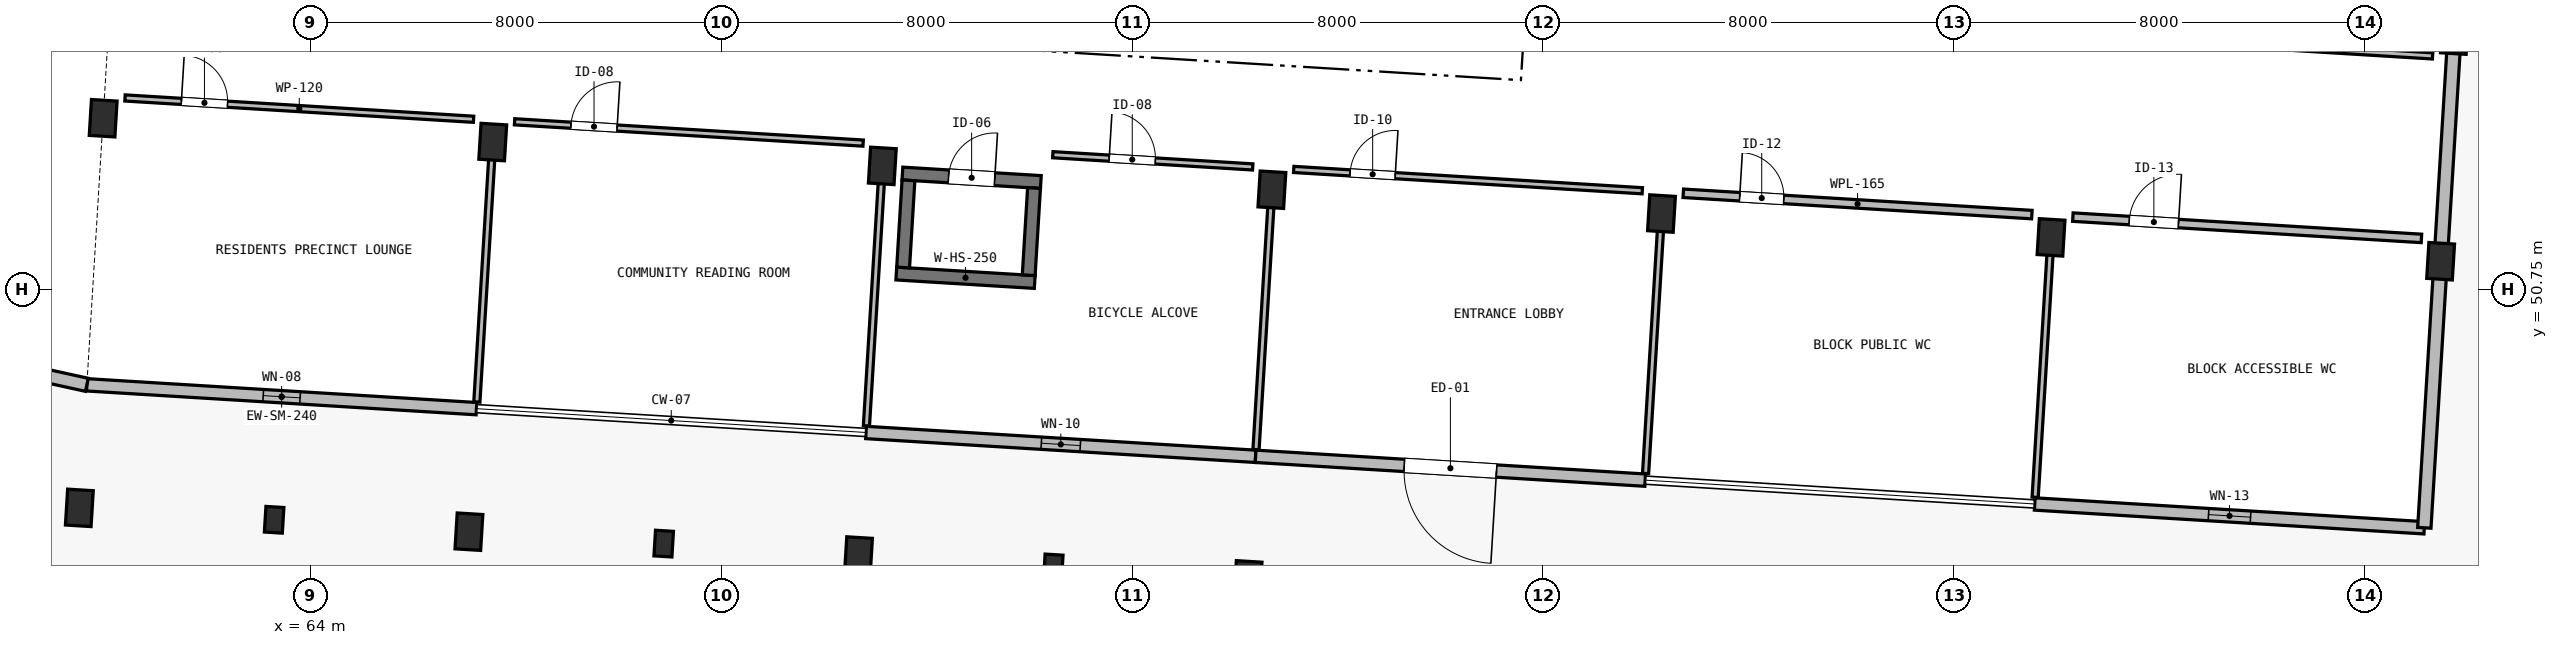
"""IFC4 building model, lengths in metres.
Left out: names, types, materials, properties, quantities, classifications, styles, units other than length and angle.
Written with IfcOpenShell. Run it as: python <this file> out.ifc"""

import sys

from ifc_helpers import new_model, si_unit, direction, frame, frame_2d, origin, origin_2d, place, context, subcontext, project, spatial, rectangle, extrude, element, fill, save


model = new_model("IFC4")
c1 = context("Model", 3, precision=1e-05, world=origin(), true_north=direction((0.0, 1.0)))
c2 = subcontext(c1, "Body", "Model", "MODEL_VIEW")
j1 = project(units=[si_unit("LENGTHUNIT", "METRE"), si_unit("PLANEANGLEUNIT", "RADIAN")], contexts=[c1])
p1 = place(None, origin())
s1 = spatial("IfcSite", under=j1, at=p1, CompositionType="ELEMENT")
p2 = place(p1, origin())
s2 = spatial("IfcBuilding", under=s1, at=p2, CompositionType="ELEMENT")
p3 = place(p2, origin())
s3 = spatial("IfcBuildingStorey", under=s2, at=p3, CompositionType="ELEMENT", Elevation=0.0)
for number, where, z_axis, x_axis in (
    (1, (59.5, 46.5, -0.35), (0.0, 0.0, 1.0), (0.998, -0.061, 0.0)),
    (2, (59.964, 54.086, -0.35), (0.0, 0.0, 1.0), (0.998, -0.061, 0.0)),
    (3, (67.086, 46.036, -0.35), (0.0, 0.0, 1.0), (0.998, -0.061, 0.0)),
    (4, (67.55, 53.622, -0.35), (0.0, 0.0, 1.0), (0.998, -0.061, 0.0)),
    (5, (74.672, 45.572, -0.35), (0.0, 0.0, 1.0), (0.998, -0.061, 0.0)),
    (6, (75.135, 53.158, -0.35), (0.0, 0.0, 1.0), (0.998, -0.061, 0.0)),
    (7, (82.258, 45.108, -0.35), (0.0, 0.0, 1.0), (0.998, -0.061, 0.0)),
    (8, (82.721, 52.694, -0.35), (0.0, 0.0, 1.0), (0.998, -0.061, 0.0)),
    (9, (90.307, 52.23, -0.35), (0.0, 0.0, 1.0), (0.998, -0.061, 0.0)),
    (10, (97.893, 51.766, -0.35), (0.0, 0.0, 1.0), (0.998, -0.061, 0.0)),
    (11, (105.479, 51.302, -0.35), (0.0, 0.0, 1.0), (0.998, -0.061, 0.0)),
    (12, (105.748, 55.694, -0.35), (0.0, 0.0, 1.0), (0.998, -0.061, 0.0)),
):
    element("IfcColumn", number, at=place(p3, frame(where, z_axis=z_axis, x_axis=x_axis)), inside=s3, PredefinedType="COLUMN", context=c2, shape_type="SweptSolid", body=[
        extrude(rectangle(XDim=0.5, YDim=0.7, at=origin_2d()), origin(), (0.0, 0.0, 1.0), 4.85),
    ])
for number, where, z_axis, x_axis in (
    (13, (63.293, 46.268, -0.35), (0.0, 0.0, 1.0), (0.998, -0.061, 0.0)),
    (14, (70.879, 45.804, -0.35), (0.0, 0.0, 1.0), (0.998, -0.061, 0.0)),
    (15, (78.465, 45.34, -0.35), (0.0, 0.0, 1.0), (0.998, -0.061, 0.0)),
):
    element("IfcColumn", number, at=place(p3, frame(where, z_axis=z_axis, x_axis=x_axis)), inside=s3, PredefinedType="PILASTER", context=c2, shape_type="SweptSolid", body=[
        extrude(rectangle(XDim=0.35, YDim=0.5, at=origin_2d()), origin(), (0.0, 0.0, 1.0), 3.7),
    ])
p4 = place(p3, frame((75.408, 51.062, -0.35), z_axis=(0.0, 0.0, 1.0), x_axis=(0.998135757881, -0.061032850491, 0.0)))
e16 = element("IfcWall", 16, at=p4, inside=s3, PredefinedType="SHEAR", context=c2, shape_type="SweptSolid", body=[
    extrude(rectangle(XDim=2.7, YDim=0.25, at=frame_2d((1.35, 0.0))), origin(), (0.0, 0.0, 1.0), 4.85),
])
p5 = place(p3, frame((75.527, 53.009, -0.35), z_axis=(0.0, 0.0, 1.0), x_axis=(0.998129907752, -0.061128448781, 0.0)))
e17 = element("IfcWall", 17, at=p5, inside=s3, PredefinedType="SHEAR", context=c2, shape_type="SweptSolid", body=[
    extrude(rectangle(XDim=2.7, YDim=0.25, at=frame_2d((1.35, 0.0))), origin(), (0.0, 0.0, 1.0), 4.85),
])
p6 = place(p5, frame((0.9, 0.0, 0.35)))
e18 = element("IfcOpeningElement", 18, at=p6, cuts=e17, PredefinedType="OPENING", context=c2, shape_type="SweptSolid", body=[
    extrude(rectangle(XDim=0.9, YDim=2.05, at=frame_2d((0.45, 1.025))), frame((0.0, 0.14, 0.0), z_axis=(0.0, -1.0, 0.0), x_axis=(1.0, 0.0, 0.0)), (0.0, 0.0, 1.0), 0.28),
])
p7 = place(p3, frame((75.541, 51.179, -0.35), z_axis=(0.0, 0.0, 1.0), x_axis=(0.061037062968, 0.998135500293, 0.0)))
e19 = element("IfcWall", 19, at=p7, inside=s3, PredefinedType="SHEAR", context=c2, shape_type="SweptSolid", body=[
    extrude(rectangle(XDim=1.7, YDim=0.25, at=frame_2d((0.85, 0.0))), origin(), (0.0, 0.0, 1.0), 4.85),
])
p8 = place(p3, frame((77.986, 51.03, -0.35), z_axis=(0.0, 0.0, 1.0), x_axis=(0.061028314627, 0.998136035225, 0.0)))
e20 = element("IfcWall", 20, at=p8, inside=s3, PredefinedType="SHEAR", context=c2, shape_type="SweptSolid", body=[
    extrude(rectangle(XDim=1.7, YDim=0.25, at=frame_2d((0.85, 0.0))), origin(), (0.0, 0.0, 1.0), 4.85),
])
p9 = place(p3, frame((67.232, 48.432, 0.0), z_axis=(0.0, 0.0, 1.0), x_axis=(-0.998135669243, 0.061034300063, 0.0)))
e21 = element("IfcWall", 21, at=p9, inside=s3, PredefinedType="SOLIDWALL", context=c2, shape_type="SweptSolid", body=[
    extrude(rectangle(XDim=7.6, YDim=0.24, at=frame_2d((3.8, 0.0))), origin(), (0.0, 0.0, 1.0), 3.35),
])
p10 = place(p9, frame((3.44, 0.0, 0.55)))
e22 = element("IfcOpeningElement", 22, at=p10, cuts=e21, PredefinedType="OPENING", context=c2, shape_type="SweptSolid", body=[
    extrude(rectangle(XDim=0.72, YDim=2.16, at=frame_2d((0.36, 1.08))), frame((0.0, 0.135, 0.0), z_axis=(0.0, -1.0, 0.0), x_axis=(1.0, 0.0, 0.0)), (0.0, 0.0, 1.0), 0.27),
])
p11 = place(p3, frame((82.404, 47.504, 0.0), z_axis=(0.0, 0.0, 1.0), x_axis=(-0.998135669243, 0.061034300063, 0.0)))
e23 = element("IfcWall", 23, at=p11, inside=s3, PredefinedType="SOLIDWALL", context=c2, shape_type="SweptSolid", body=[
    extrude(rectangle(XDim=7.6, YDim=0.24, at=frame_2d((3.8, 0.0))), origin(), (0.0, 0.0, 1.0), 3.35),
])
p12 = place(p11, frame((3.42, 0.0, 0.55)))
e24 = element("IfcOpeningElement", 24, at=p12, cuts=e23, PredefinedType="OPENING", context=c2, shape_type="SweptSolid", body=[
    extrude(rectangle(XDim=0.76, YDim=2.34, at=frame_2d((0.38, 1.17))), frame((0.0, 0.135, 0.0), z_axis=(0.0, -1.0, 0.0), x_axis=(1.0, 0.0, 0.0)), (0.0, 0.0, 1.0), 0.27),
])
p13 = place(p3, frame((89.99, 47.04, 0.0), z_axis=(0.0, 0.0, 1.0), x_axis=(-0.998133591969, 0.061068261669, 0.0)))
e25 = element("IfcWall", 25, at=p13, inside=s3, PredefinedType="SOLIDWALL", context=c2, shape_type="SweptSolid", body=[
    extrude(rectangle(XDim=7.6, YDim=0.24, at=frame_2d((3.8, 0.0))), origin(), (0.0, 0.0, 1.0), 3.35),
])
p14 = place(p13, frame((2.9, 0.0, 0.0)))
e26 = element("IfcOpeningElement", 26, at=p14, cuts=e25, PredefinedType="OPENING", context=c2, shape_type="SweptSolid", body=[
    extrude(rectangle(XDim=1.8, YDim=2.4, at=frame_2d((0.9, 1.2))), frame((0.0, 0.135, 0.0), z_axis=(0.0, -1.0, 0.0), x_axis=(1.0, 0.0, 0.0)), (0.0, 0.0, 1.0), 0.27),
])
p15 = place(p3, frame((105.161, 46.112, 0.0), z_axis=(0.0, 0.0, 1.0), x_axis=(-0.998135549572, 0.061036257095, 0.0)))
e27 = element("IfcWall", 27, at=p15, inside=s3, PredefinedType="SOLIDWALL", context=c2, shape_type="SweptSolid", body=[
    extrude(rectangle(XDim=7.6, YDim=0.24, at=frame_2d((3.8, 0.0))), origin(), (0.0, 0.0, 1.0), 3.35),
])
p16 = place(p15, frame((3.39, 0.0, 0.55)))
e28 = element("IfcOpeningElement", 28, at=p16, cuts=e27, PredefinedType="OPENING", context=c2, shape_type="SweptSolid", body=[
    extrude(rectangle(XDim=0.82, YDim=2.18, at=frame_2d((0.41, 1.09))), frame((0.0, 0.135, 0.0), z_axis=(0.0, -1.0, 0.0), x_axis=(1.0, 0.0, 0.0)), (0.0, 0.0, 1.0), 0.27),
])
p17 = place(p3, frame((59.646, 48.896, 0.0), z_axis=(0.0, 0.0, 1.0), x_axis=(-0.976741647881, 0.214419573019, 0.0)))
e29 = element("IfcWall", 29, at=p17, inside=s3, PredefinedType="SOLIDWALL", context=c2, shape_type="SweptSolid", body=[
    extrude(rectangle(XDim=6.478, YDim=0.26, at=frame_2d((3.239, 0.0))), origin(), (0.0, 0.0, 1.0), 3.85),
])
p18 = place(p3, frame((53.32, 50.284, 0.0), z_axis=(0.0, 0.0, 1.0), x_axis=(0.423516863973, 0.905888219335, 0.0)))
e30 = element("IfcWall", 30, at=p18, inside=s3, PredefinedType="SOLIDWALL", context=c2, shape_type="SweptSolid", body=[
    extrude(rectangle(XDim=17.418, YDim=0.26, at=frame_2d((8.709, 0.0))), origin(), (0.0, 0.0, 1.0), 3.35),
])
p19 = place(p3, frame((106.065, 60.884, 0.0), z_axis=(0.0, 0.0, 1.0), x_axis=(-0.06105237445, -0.998134563861, 0.0)))
e31 = element("IfcWall", 31, at=p19, inside=s3, PredefinedType="SOLIDWALL", context=c2, shape_type="SweptSolid", body=[
    extrude(rectangle(XDim=14.8, YDim=0.26, at=frame_2d((7.4, 0.0))), origin(), (0.0, 0.0, 1.0), 3.35),
])
p20 = place(p3, frame((60.389, 54.481, 0.0), z_axis=(0.0, 0.0, 1.0), x_axis=(0.998133446169, -0.061070644651, 0.0)))
e32 = element("IfcWall", 32, at=p20, inside=s3, PredefinedType="PARTITIONING", context=c2, shape_type="SweptSolid", body=[
    extrude(rectangle(XDim=6.8, YDim=0.12, at=frame_2d((3.4, 0.0))), origin(), (0.0, 0.0, 1.0), 4.22),
])
p21 = place(p20, frame((1.1, 0.0, 0.0)))
e33 = element("IfcOpeningElement", 33, at=p21, cuts=e32, PredefinedType="OPENING", context=c2, shape_type="SweptSolid", body=[
    extrude(rectangle(XDim=0.9, YDim=2.1, at=frame_2d((0.45, 1.05))), frame((0.0, 0.075, 0.0), z_axis=(0.0, -1.0, 0.0), x_axis=(1.0, 0.0, 0.0)), (0.0, 0.0, 1.0), 0.15),
])
p22 = place(p3, frame((67.975, 54.017, 0.0), z_axis=(0.0, 0.0, 1.0), x_axis=(0.998135634047, -0.061034875648, 0.0)))
e34 = element("IfcWall", 34, at=p22, inside=s3, PredefinedType="PARTITIONING", context=c2, shape_type="SweptSolid", body=[
    extrude(rectangle(XDim=6.8, YDim=0.12, at=frame_2d((3.4, 0.0))), origin(), (0.0, 0.0, 1.0), 4.22),
])
p23 = place(p22, frame((1.1, 0.0, 0.0)))
e35 = element("IfcOpeningElement", 35, at=p23, cuts=e34, PredefinedType="OPENING", context=c2, shape_type="SweptSolid", body=[
    extrude(rectangle(XDim=0.9, YDim=2.1, at=frame_2d((0.45, 1.05))), frame((0.0, 0.075, 0.0), z_axis=(0.0, -1.0, 0.0), x_axis=(1.0, 0.0, 0.0)), (0.0, 0.0, 1.0), 0.15),
])
p24 = place(p3, frame((67.24, 48.561, 0.0), z_axis=(0.0, 0.0, 1.0), x_axis=(0.061034663384, 0.998135647027, 0.0)))
e36 = element("IfcWall", 36, at=p24, inside=s3, PredefinedType="PARTITIONING", context=c2, shape_type="SweptSolid", body=[
    extrude(rectangle(XDim=4.74, YDim=0.12, at=frame_2d((2.37, 0.0))), origin(), (0.0, 0.0, 1.0), 3.32),
])
p25 = place(p3, frame((78.455, 53.376, 0.0), z_axis=(0.0, 0.0, 1.0), x_axis=(0.998131890624, -0.061096063045, 0.0)))
e37 = element("IfcWall", 37, at=p25, inside=s3, PredefinedType="PARTITIONING", context=c2, shape_type="SweptSolid", body=[
    extrude(rectangle(XDim=3.9, YDim=0.12, at=frame_2d((1.95, 0.0))), origin(), (0.0, 0.0, 1.0), 4.22),
])
p26 = place(p25, frame((1.1, 0.0, 0.0)))
e38 = element("IfcOpeningElement", 38, at=p26, cuts=e37, PredefinedType="OPENING", context=c2, shape_type="SweptSolid", body=[
    extrude(rectangle(XDim=0.9, YDim=2.1, at=frame_2d((0.45, 1.05))), frame((0.0, 0.075, 0.0), z_axis=(0.0, -1.0, 0.0), x_axis=(1.0, 0.0, 0.0)), (0.0, 0.0, 1.0), 0.15),
])
p27 = place(p3, frame((74.826, 48.097, 0.0), z_axis=(0.0, 0.0, 1.0), x_axis=(0.061034663384, 0.998135647027, 0.0)))
e39 = element("IfcWall", 39, at=p27, inside=s3, PredefinedType="PARTITIONING", context=c2, shape_type="SweptSolid", body=[
    extrude(rectangle(XDim=4.74, YDim=0.12, at=frame_2d((2.37, 0.0))), origin(), (0.0, 0.0, 1.0), 3.32),
])
p28 = place(p3, frame((83.146, 53.089, 0.0), z_axis=(0.0, 0.0, 1.0), x_axis=(0.998135634047, -0.061034875648, 0.0)))
e40 = element("IfcWall", 40, at=p28, inside=s3, PredefinedType="PARTITIONING", context=c2, shape_type="SweptSolid", body=[
    extrude(rectangle(XDim=6.8, YDim=0.12, at=frame_2d((3.4, 0.0))), origin(), (0.0, 0.0, 1.0), 4.22),
])
p29 = place(p28, frame((1.1, 0.0, 0.0)))
e41 = element("IfcOpeningElement", 41, at=p29, cuts=e40, PredefinedType="OPENING", context=c2, shape_type="SweptSolid", body=[
    extrude(rectangle(XDim=0.88, YDim=2.1, at=frame_2d((0.44, 1.05))), frame((0.0, 0.075, 0.0), z_axis=(0.0, -1.0, 0.0), x_axis=(1.0, 0.0, 0.0)), (0.0, 0.0, 1.0), 0.15),
])
p30 = place(p3, frame((82.412, 47.633, 0.0), z_axis=(0.0, 0.0, 1.0), x_axis=(0.061085977316, 0.998132507924, 0.0)))
e42 = element("IfcWall", 42, at=p30, inside=s3, PredefinedType="PARTITIONING", context=c2, shape_type="SweptSolid", body=[
    extrude(rectangle(XDim=4.74, YDim=0.12, at=frame_2d((2.37, 0.0))), origin(), (0.0, 0.0, 1.0), 3.32),
])
p31 = place(p3, frame((90.732, 52.625, 0.0), z_axis=(0.0, 0.0, 1.0), x_axis=(0.998135634047, -0.061034875648, 0.0)))
e43 = element("IfcWall", 43, at=p31, inside=s3, PredefinedType="PLUMBINGWALL", context=c2, shape_type="SweptSolid", body=[
    extrude(rectangle(XDim=6.8, YDim=0.165, at=frame_2d((3.4, 0.0))), origin(), (0.0, 0.0, 1.0), 4.22),
])
p32 = place(p31, frame((1.1, 0.0, 0.0)))
e44 = element("IfcOpeningElement", 44, at=p32, cuts=e43, PredefinedType="OPENING", context=c2, shape_type="SweptSolid", body=[
    extrude(rectangle(XDim=0.86, YDim=2.1, at=frame_2d((0.43, 1.05))), frame((0.0, 0.097, 0.0), z_axis=(0.0, -1.0, 0.0), x_axis=(1.0, 0.0, 0.0)), (0.0, 0.0, 1.0), 0.195),
])
p33 = place(p3, frame((89.998, 47.169, 0.0), z_axis=(0.0, 0.0, 1.0), x_axis=(0.061034663384, 0.998135647027, 0.0)))
e45 = element("IfcWall", 45, at=p33, inside=s3, PredefinedType="PARTITIONING", context=c2, shape_type="SweptSolid", body=[
    extrude(rectangle(XDim=4.74, YDim=0.12, at=frame_2d((2.37, 0.0))), origin(), (0.0, 0.0, 1.0), 3.32),
])
p34 = place(p3, frame((98.318, 52.161, 0.0), z_axis=(0.0, 0.0, 1.0), x_axis=(0.998133446169, -0.061070644651, 0.0)))
e46 = element("IfcWall", 46, at=p34, inside=s3, PredefinedType="PLUMBINGWALL", context=c2, shape_type="SweptSolid", body=[
    extrude(rectangle(XDim=6.8, YDim=0.165, at=frame_2d((3.4, 0.0))), origin(), (0.0, 0.0, 1.0), 4.22),
])
p35 = place(p34, frame((1.1, 0.0, 0.0)))
e47 = element("IfcOpeningElement", 47, at=p35, cuts=e46, PredefinedType="OPENING", context=c2, shape_type="SweptSolid", body=[
    extrude(rectangle(XDim=0.96, YDim=2.12, at=frame_2d((0.48, 1.06))), frame((0.0, 0.097, 0.0), z_axis=(0.0, -1.0, 0.0), x_axis=(1.0, 0.0, 0.0)), (0.0, 0.0, 1.0), 0.195),
])
p36 = place(p3, frame((97.583, 46.705, 0.0), z_axis=(0.0, 0.0, 1.0), x_axis=(0.061085977316, 0.998132507924, 0.0)))
e48 = element("IfcWall", 48, at=p36, inside=s3, PredefinedType="PARTITIONING", context=c2, shape_type="SweptSolid", body=[
    extrude(rectangle(XDim=4.74, YDim=0.12, at=frame_2d((2.37, 0.0))), origin(), (0.0, 0.0, 1.0), 3.32),
])
p37 = place(p3, frame((98.535, 55.714, 0.0), z_axis=(0.0, 0.0, 1.0), x_axis=(0.998135634047, -0.061034875648, 0.0)))
e49 = element("IfcWall", 49, at=p37, inside=s3, PredefinedType="PARTITIONING", context=c2, shape_type="SweptSolid", body=[
    extrude(rectangle(XDim=6.8, YDim=0.12, at=frame_2d((3.4, 0.0))), origin(), (0.0, 0.0, 1.0), 4.22),
])
p38 = place(p37, frame((1.8, 0.0, 0.0)))
e50 = element("IfcOpeningElement", 50, at=p38, cuts=e49, PredefinedType="OPENING", context=c2, shape_type="SweptSolid", body=[
    extrude(rectangle(XDim=0.9, YDim=2.1, at=frame_2d((0.45, 1.05))), frame((0.0, 0.075, 0.0), z_axis=(0.0, -1.0, 0.0), x_axis=(1.0, 0.0, 0.0)), (0.0, 0.0, 1.0), 0.15),
])
p39 = place(p10, origin())
e51 = element("IfcWindow", 51, at=p39, inside=s3, PartitioningType="SINGLE_PANEL", PredefinedType="WINDOW", context=c2, shape_type="SweptSolid", body=[
    extrude(rectangle(XDim=0.72, YDim=2.16, at=frame_2d((0.36, 1.08))), frame((0.0, 0.03, 0.0), z_axis=(0.0, -1.0, 0.0), x_axis=(1.0, 0.0, 0.0)), (0.0, 0.0, 1.0), 0.06),
])
fill(e22, e51)
p40 = place(p12, origin())
e52 = element("IfcWindow", 52, at=p40, inside=s3, PartitioningType="SINGLE_PANEL", PredefinedType="WINDOW", context=c2, shape_type="SweptSolid", body=[
    extrude(rectangle(XDim=0.76, YDim=2.34, at=frame_2d((0.38, 1.17))), frame((0.0, 0.03, 0.0), z_axis=(0.0, -1.0, 0.0), x_axis=(1.0, 0.0, 0.0)), (0.0, 0.0, 1.0), 0.06),
])
fill(e24, e52)
p41 = place(p14, origin())
e53 = element("IfcDoor", 53, at=p41, inside=s3, OperationType="DOUBLE_DOOR_SINGLE_SWING", PredefinedType="DOOR", context=c2, shape_type="SweptSolid", body=[
    extrude(rectangle(XDim=1.8, YDim=2.4, at=frame_2d((0.9, 1.2))), frame((0.0, 0.025, 0.0), z_axis=(0.0, -1.0, 0.0), x_axis=(1.0, 0.0, 0.0)), (0.0, 0.0, 1.0), 0.05),
])
fill(e26, e53)
p42 = place(p16, origin())
e54 = element("IfcWindow", 54, at=p42, inside=s3, PartitioningType="SINGLE_PANEL", PredefinedType="WINDOW", context=c2, shape_type="SweptSolid", body=[
    extrude(rectangle(XDim=0.82, YDim=2.18, at=frame_2d((0.41, 1.09))), frame((0.0, 0.03, 0.0), z_axis=(0.0, -1.0, 0.0), x_axis=(1.0, 0.0, 0.0)), (0.0, 0.0, 1.0), 0.06),
])
fill(e28, e54)
p43 = place(p21, origin())
e55 = element("IfcDoor", 55, at=p43, inside=s3, OperationType="SINGLE_SWING_LEFT", PredefinedType="DOOR", context=c2, shape_type="SweptSolid", body=[
    extrude(rectangle(XDim=0.9, YDim=2.1, at=frame_2d((0.45, 1.05))), frame((0.0, 0.025, 0.0), z_axis=(0.0, -1.0, 0.0), x_axis=(1.0, 0.0, 0.0)), (0.0, 0.0, 1.0), 0.05),
])
fill(e33, e55)
p44 = place(p23, origin())
e56 = element("IfcDoor", 56, at=p44, inside=s3, OperationType="SINGLE_SWING_RIGHT", PredefinedType="DOOR", context=c2, shape_type="SweptSolid", body=[
    extrude(rectangle(XDim=0.9, YDim=2.1, at=frame_2d((0.45, 1.05))), frame((0.0, 0.025, 0.0), z_axis=(0.0, -1.0, 0.0), x_axis=(1.0, 0.0, 0.0)), (0.0, 0.0, 1.0), 0.05),
])
fill(e35, e56)
p45 = place(p26, origin())
e57 = element("IfcDoor", 57, at=p45, inside=s3, OperationType="SINGLE_SWING_LEFT", PredefinedType="DOOR", context=c2, shape_type="SweptSolid", body=[
    extrude(rectangle(XDim=0.9, YDim=2.1, at=frame_2d((0.45, 1.05))), frame((0.0, 0.025, 0.0), z_axis=(0.0, -1.0, 0.0), x_axis=(1.0, 0.0, 0.0)), (0.0, 0.0, 1.0), 0.05),
])
fill(e38, e57)
p46 = place(p29, origin())
e58 = element("IfcDoor", 58, at=p46, inside=s3, OperationType="SINGLE_SWING_RIGHT", PredefinedType="DOOR", context=c2, shape_type="SweptSolid", body=[
    extrude(rectangle(XDim=0.88, YDim=2.1, at=frame_2d((0.44, 1.05))), frame((0.0, 0.025, 0.0), z_axis=(0.0, -1.0, 0.0), x_axis=(1.0, 0.0, 0.0)), (0.0, 0.0, 1.0), 0.05),
])
fill(e41, e58)
p47 = place(p32, origin())
e59 = element("IfcDoor", 59, at=p47, inside=s3, OperationType="SINGLE_SWING_LEFT", PredefinedType="DOOR", context=c2, shape_type="SweptSolid", body=[
    extrude(rectangle(XDim=0.86, YDim=2.1, at=frame_2d((0.43, 1.05))), frame((0.0, 0.025, 0.0), z_axis=(0.0, -1.0, 0.0), x_axis=(1.0, 0.0, 0.0)), (0.0, 0.0, 1.0), 0.05),
])
fill(e44, e59)
p48 = place(p35, origin())
e60 = element("IfcDoor", 60, at=p48, inside=s3, OperationType="SINGLE_SWING_RIGHT", PredefinedType="DOOR", context=c2, shape_type="SweptSolid", body=[
    extrude(rectangle(XDim=0.96, YDim=2.12, at=frame_2d((0.48, 1.06))), frame((0.0, 0.025, 0.0), z_axis=(0.0, -1.0, 0.0), x_axis=(1.0, 0.0, 0.0)), (0.0, 0.0, 1.0), 0.05),
])
fill(e47, e60)
p49 = place(p6, origin())
e61 = element("IfcDoor", 61, at=p49, inside=s3, OperationType="SINGLE_SWING_RIGHT", PredefinedType="DOOR", context=c2, shape_type="SweptSolid", body=[
    extrude(rectangle(XDim=0.9, YDim=2.05, at=frame_2d((0.45, 1.025))), frame((0.0, 0.025, 0.0), z_axis=(0.0, -1.0, 0.0), x_axis=(1.0, 0.0, 0.0)), (0.0, 0.0, 1.0), 0.05),
])
fill(e18, e61)
save(model, sys.argv[1])
